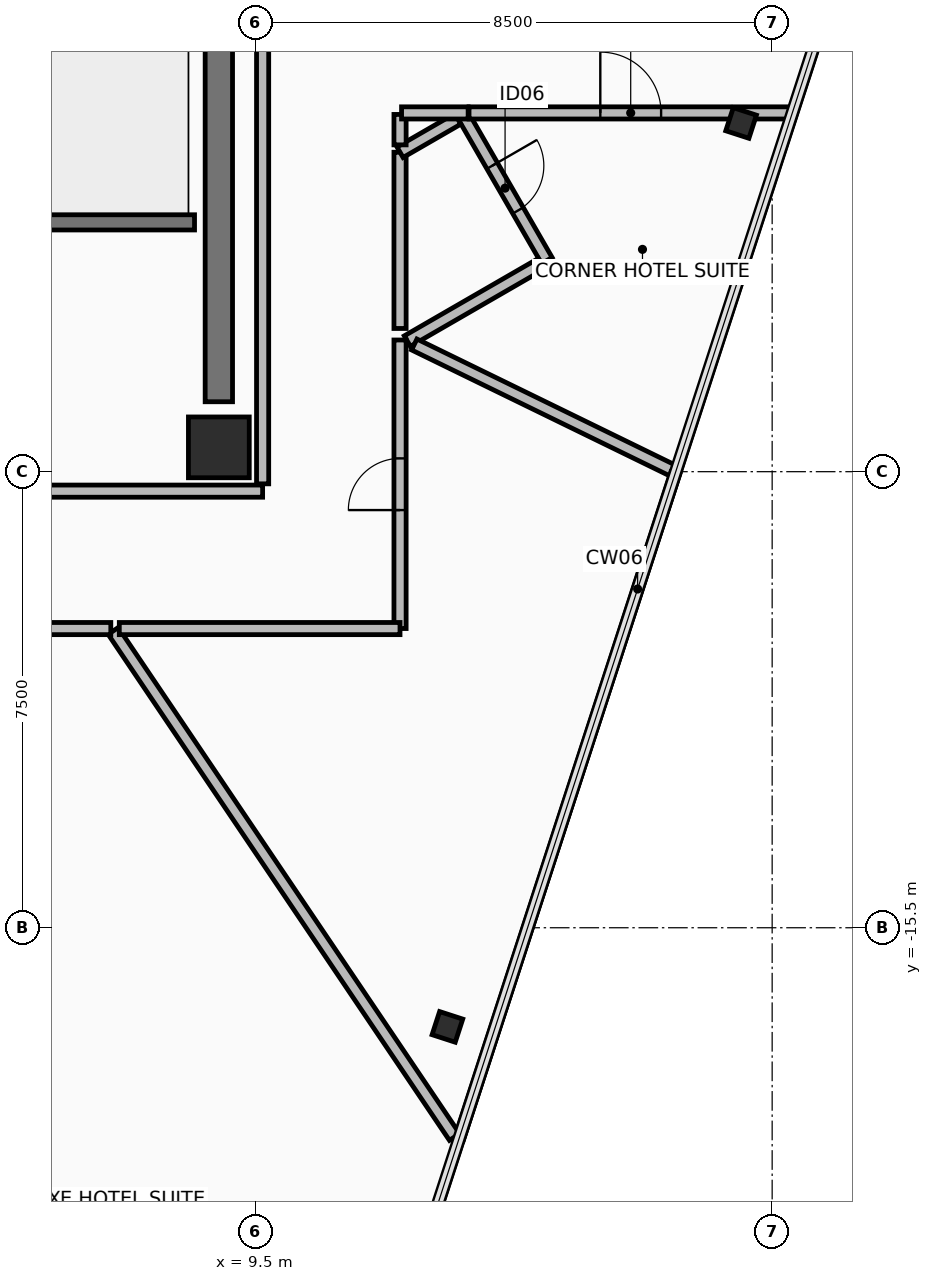
"""IFC4 building model, lengths in metres.
Left out: names, types, materials, properties, quantities, classifications, styles, units other than length and angle.
Written with IfcOpenShell. Run it as: python <this file> out.ifc"""

import sys

from ifc_helpers import new_model, si_unit, direction, frame, frame_2d, origin, origin_2d, place, context, subcontext, project, spatial, rectangle, hollow_rectangle, extrude, element, fill, save


model = new_model("IFC4")
c1 = context("Model", 3, precision=1e-05, world=origin(), true_north=direction((0.0, 1.0)))
c2 = subcontext(c1, "Body", "Model", "MODEL_VIEW")
j1 = project(units=[si_unit("LENGTHUNIT", "METRE"), si_unit("PLANEANGLEUNIT", "RADIAN")], contexts=[c1])
p1 = place(None, origin())
s1 = spatial("IfcSite", under=j1, at=p1, CompositionType="ELEMENT")
p2 = place(p1, origin())
s2 = spatial("IfcBuilding", under=s1, at=p2, CompositionType="ELEMENT")
p3 = place(p2, frame((0.0, 0.0, 279.75)))
s3 = spatial("IfcBuildingStorey", under=s2, at=p3, CompositionType="ELEMENT", Elevation=279.75)
p4 = place(p3, frame((8.9, -7.6, 0.0), z_axis=(0.0, 0.0, 1.0), x_axis=(1.0, 0.0, 0.0)))
e1 = element("IfcColumn", 1, at=p4, inside=s3, PredefinedType="COLUMN", context=c2, shape_type="SweptSolid", body=[
    extrude(rectangle(XDim=1.0, YDim=1.0, at=origin_2d()), origin(), (0.0, 0.0, 1.0), 3.65),
])
p5 = place(p3, frame((12.659, -17.131, -0.19), z_axis=(0.0, 0.0, 1.0), x_axis=(0.309018654281, 0.951055976957, 0.0)))
e2 = element("IfcColumn", 2, at=p5, inside=s3, PredefinedType="COLUMN", context=c2, shape_type="SweptSolid", body=[
    extrude(hollow_rectangle(XDim=0.4, YDim=0.4, WallThickness=0.025, at=origin_2d()), origin(), (0.0, 0.0, 1.0), 3.84),
])
p6 = place(p3, frame((17.489, -2.265, 0.0), z_axis=(0.0, 0.0, 1.0), x_axis=(0.309018654281, 0.951055976957, 0.0)))
e3 = element("IfcColumn", 3, at=p6, inside=s3, PredefinedType="COLUMN", context=c2, shape_type="SweptSolid", body=[
    extrude(hollow_rectangle(XDim=0.4, YDim=0.4, WallThickness=0.025, at=origin_2d()), origin(), (0.0, 0.0, 1.0), 3.65),
])
p7 = place(p3, frame((8.9, -6.85, 0.0), z_axis=(0.0, 0.0, 1.0), x_axis=(0.0, 1.0, 0.0)))
e4 = element("IfcWall", 4, at=p7, inside=s3, PredefinedType="SHEAR", context=c2, shape_type="SweptSolid", body=[
    extrude(rectangle(XDim=10.7, YDim=0.45, at=frame_2d((5.35, 0.0))), origin(), (0.0, 0.0, 1.0), 3.465),
])
p8 = place(p3, frame((-9.62, -8.32, 0.0), z_axis=(0.0, 0.0, 1.0), x_axis=(1.0, 0.0, 0.0)))
e5 = element("IfcWall", 5, at=p8, inside=s3, PredefinedType="PARTITIONING", context=c2, shape_type="SweptSolid", body=[
    extrude(rectangle(XDim=19.24, YDim=0.2, at=frame_2d((9.62, 0.0))), origin(), (0.0, 0.0, 1.0), 2.96),
])
p9 = place(p8, frame((7.37, 0.0, 0.0)))
e6 = element("IfcOpeningElement", 6, at=p9, cuts=e5, PredefinedType="OPENING", context=c2, shape_type="SweptSolid", body=[
    extrude(rectangle(XDim=0.9, YDim=2.1, at=frame_2d((0.45, 1.05))), frame((0.0, 0.11, 0.0), z_axis=(0.0, -1.0, 0.0), x_axis=(1.0, 0.0, 0.0)), (0.0, 0.0, 1.0), 0.22),
])
p10 = place(p8, frame((10.77, 0.0, 0.0)))
e7 = element("IfcOpeningElement", 7, at=p10, cuts=e5, PredefinedType="OPENING", context=c2, shape_type="SweptSolid", body=[
    extrude(rectangle(XDim=0.9, YDim=2.1, at=frame_2d((0.45, 1.05))), frame((0.0, 0.11, 0.0), z_axis=(0.0, -1.0, 0.0), x_axis=(1.0, 0.0, 0.0)), (0.0, 0.0, 1.0), 0.22),
])
p11 = place(p8, frame((13.97, 0.0, 0.0)))
e8 = element("IfcOpeningElement", 8, at=p11, cuts=e5, PredefinedType="OPENING", context=c2, shape_type="SweptSolid", body=[
    extrude(rectangle(XDim=0.9, YDim=2.1, at=frame_2d((0.45, 1.05))), frame((0.0, 0.11, 0.0), z_axis=(0.0, -1.0, 0.0), x_axis=(1.0, 0.0, 0.0)), (0.0, 0.0, 1.0), 0.22),
])
p12 = place(p3, frame((9.62, -8.2, 0.0), z_axis=(0.0, 0.0, 1.0), x_axis=(0.0, 1.0, 0.0)))
e9 = element("IfcWall", 9, at=p12, inside=s3, PredefinedType="PARTITIONING", context=c2, shape_type="SweptSolid", body=[
    extrude(rectangle(XDim=16.4, YDim=0.2, at=frame_2d((8.2, 0.0))), origin(), (0.0, 0.0, 1.0), 2.96),
])
p13 = place(p12, frame((12.65, 0.0, 0.0)))
e10 = element("IfcOpeningElement", 10, at=p13, cuts=e9, PredefinedType="OPENING", context=c2, shape_type="SweptSolid", body=[
    extrude(rectangle(XDim=1.1, YDim=2.15, at=frame_2d((0.55, 1.075))), frame((0.0, 0.11, 0.0), z_axis=(0.0, -1.0, 0.0), x_axis=(1.0, 0.0, 0.0)), (0.0, 0.0, 1.0), 0.22),
])
p14 = place(p3, frame((5.5, -3.9, 0.0), z_axis=(0.0, 0.0, 1.0), x_axis=(1.0, 0.0, 0.0)))
e11 = element("IfcWall", 11, at=p14, inside=s3, PredefinedType="SHEAR", context=c2, shape_type="SweptSolid", body=[
    extrude(rectangle(XDim=3.0, YDim=0.25, at=frame_2d((1.5, 0.0))), origin(), (0.0, 0.0, 1.0), 3.465),
])
p15 = place(p3, frame((12.92, -2.146, 0.0), z_axis=(0.0, 0.0, 1.0), x_axis=(0.499996545922, -0.866027397988, 0.0)))
e12 = element("IfcWall", 12, at=p15, inside=s3, PredefinedType="PARTITIONING", context=c2, shape_type="SweptSolid", body=[
    extrude(rectangle(XDim=2.75, YDim=0.2, at=frame_2d((1.375, 0.0))), origin(), (0.0, 0.0, 1.0), 2.96),
])
p16 = place(p15, frame((0.95, 0.0, 0.0)))
e13 = element("IfcOpeningElement", 13, at=p16, cuts=e12, PredefinedType="OPENING", context=c2, shape_type="SweptSolid", body=[
    extrude(rectangle(XDim=0.85, YDim=2.1, at=frame_2d((0.425, 1.05))), frame((0.0, 0.11, 0.0), z_axis=(0.0, -1.0, 0.0), x_axis=(1.0, 0.0, 0.0)), (0.0, 0.0, 1.0), 0.22),
])
p17 = place(p3, frame((14.204, -4.58, 0.0), z_axis=(0.0, 0.0, 1.0), x_axis=(-0.866038622153, -0.499977104415, 0.0)))
e14 = element("IfcWall", 14, at=p17, inside=s3, PredefinedType="PARTITIONING", context=c2, shape_type="SweptSolid", body=[
    extrude(rectangle(XDim=2.545, YDim=0.2, at=frame_2d((1.272, 0.0))), origin(), (0.0, 0.0, 1.0), 2.96),
])
p18 = place(p3, frame((11.88, -5.645, 0.0), z_axis=(0.0, 0.0, 1.0), x_axis=(0.0, 1.0, 0.0)))
e15 = element("IfcWall", 15, at=p18, inside=s3, PredefinedType="PARTITIONING", context=c2, shape_type="SweptSolid", body=[
    extrude(rectangle(XDim=2.898, YDim=0.2, at=frame_2d((1.449, 0.0))), origin(), (0.0, 0.0, 1.0), 2.96),
])
p19 = place(p3, frame((11.88, -2.747, 0.0), z_axis=(0.0, 0.0, 1.0), x_axis=(0.86609656662, 0.499876722092, 0.0)))
e16 = element("IfcWall", 16, at=p19, inside=s3, PredefinedType="PARTITIONING", context=c2, shape_type="SweptSolid", body=[
    extrude(rectangle(XDim=1.096, YDim=0.2, at=frame_2d((0.548, 0.0))), origin(), (0.0, 0.0, 1.0), 3.465),
])
p20 = place(p3, frame((11.88, -10.579, 0.0), z_axis=(0.0, 0.0, 1.0), x_axis=(0.0, 1.0, 0.0)))
e17 = element("IfcWall", 17, at=p20, inside=s3, PredefinedType="PARTITIONING", context=c2, shape_type="SweptSolid", body=[
    extrude(rectangle(XDim=4.745, YDim=0.2, at=frame_2d((2.373, 0.0))), origin(), (0.0, 0.0, 1.0), 2.96),
])
p21 = place(p20, frame((1.948, 0.0, 0.0)))
e18 = element("IfcOpeningElement", 18, at=p21, cuts=e17, PredefinedType="OPENING", context=c2, shape_type="SweptSolid", body=[
    extrude(rectangle(XDim=0.85, YDim=2.1, at=frame_2d((0.425, 1.05))), frame((0.0, 0.11, 0.0), z_axis=(0.0, -1.0, 0.0), x_axis=(1.0, 0.0, 0.0)), (0.0, 0.0, 1.0), 0.22),
])
p22 = place(p3, frame((12.114, -5.908, 0.0), z_axis=(0.0, 0.0, 1.0), x_axis=(0.898773373644, -0.438413529476, 0.0)))
e19 = element("IfcWall", 19, at=p22, inside=s3, PredefinedType="PARTITIONING", context=c2, shape_type="SweptSolid", body=[
    extrude(rectangle(XDim=4.761, YDim=0.2, at=frame_2d((2.381, 0.0))), origin(), (0.0, 0.0, 1.0), 2.81),
])
p23 = place(p3, frame((16.406, -8.026, 0.0), z_axis=(0.0, 0.0, 1.0), x_axis=(-0.309030454155, -0.951052142842, 0.0)))
e20 = element("IfcWall", 20, at=p23, inside=s3, PredefinedType="PARTITIONING", context=c2, shape_type="SweptSolid", body=[
    extrude(rectangle(XDim=11.514, YDim=0.15, at=frame_2d((5.757, 0.0))), origin(), (0.0, 0.0, 1.0), 3.465),
])
p24 = place(p3, frame((12.776, -18.941, 0.0), z_axis=(0.0, 0.0, 1.0), x_axis=(-0.559187933526, 0.829040924804, 0.0)))
e21 = element("IfcWall", 21, at=p24, inside=s3, PredefinedType="PARTITIONING", context=c2, shape_type="SweptSolid", body=[
    extrude(rectangle(XDim=10.038, YDim=0.2, at=frame_2d((5.019, 0.0))), origin(), (0.0, 0.0, 1.0), 2.81),
])
p25 = place(p3, frame((7.263, -10.58, 0.0), z_axis=(0.0, 0.0, 1.0), x_axis=(1.0, 0.0, 0.0)))
e22 = element("IfcWall", 22, at=p25, inside=s3, PredefinedType="PARTITIONING", context=c2, shape_type="SweptSolid", body=[
    extrude(rectangle(XDim=4.616, YDim=0.2, at=frame_2d((2.308, 0.0))), origin(), (0.0, 0.0, 1.0), 2.96),
])
p26 = place(p3, frame((0.767, -10.58, 0.0), z_axis=(0.0, 0.0, 1.0), x_axis=(1.0, 0.0, 0.0)))
e23 = element("IfcWall", 23, at=p26, inside=s3, PredefinedType="PARTITIONING", context=c2, shape_type="SweptSolid", body=[
    extrude(rectangle(XDim=6.356, YDim=0.2, at=frame_2d((3.178, 0.0))), origin(), (0.0, 0.0, 1.0), 3.465),
])
p27 = place(p26, frame((2.678, 0.0, 0.0)))
e24 = element("IfcOpeningElement", 24, at=p27, cuts=e23, PredefinedType="OPENING", context=c2, shape_type="SweptSolid", body=[
    extrude(rectangle(XDim=1.0, YDim=2.15, at=frame_2d((0.5, 1.075))), frame((0.0, 0.11, 0.0), z_axis=(0.0, -1.0, 0.0), x_axis=(1.0, 0.0, 0.0)), (0.0, 0.0, 1.0), 0.22),
])
p28 = place(p3, frame((11.88, -2.625, 0.0), z_axis=(0.0, 0.0, 1.0), x_axis=(0.0, 1.0, 0.0)))
e25 = element("IfcWall", 25, at=p28, inside=s3, PredefinedType="PARTITIONING", context=c2, shape_type="SweptSolid", body=[
    extrude(rectangle(XDim=0.5, YDim=0.2, at=frame_2d((0.25, 0.0))), origin(), (0.0, 0.0, 1.0), 3.465),
])
p29 = place(p3, frame((11.905, -2.1, 0.0), z_axis=(0.0, 0.0, 1.0), x_axis=(1.0, 0.0, 0.0)))
e26 = element("IfcWall", 26, at=p29, inside=s3, PredefinedType="PARTITIONING", context=c2, shape_type="SweptSolid", body=[
    extrude(rectangle(XDim=1.095, YDim=0.2, at=frame_2d((0.547, 0.0))), origin(), (0.0, 0.0, 1.0), 3.465),
])
p30 = place(p3, frame((13.015, -2.1, 0.0), z_axis=(0.0, 0.0, 1.0), x_axis=(1.0, 0.0, 0.0)))
e27 = element("IfcWall", 27, at=p30, inside=s3, PredefinedType="PARTITIONING", context=c2, shape_type="SweptSolid", body=[
    extrude(rectangle(XDim=5.317, YDim=0.2, at=frame_2d((2.658, 0.0))), origin(), (0.0, 0.0, 1.0), 2.81),
])
p31 = place(p30, frame((2.159, 0.0, 0.0)))
e28 = element("IfcOpeningElement", 28, at=p31, cuts=e27, PredefinedType="OPENING", context=c2, shape_type="SweptSolid", body=[
    extrude(rectangle(XDim=1.0, YDim=2.15, at=frame_2d((0.5, 1.075))), frame((0.0, 0.11, 0.0), z_axis=(0.0, -1.0, 0.0), x_axis=(1.0, 0.0, 0.0)), (0.0, 0.0, 1.0), 0.22),
])
p32 = place(p16, origin())
e29 = element("IfcDoor", 29, at=p32, inside=s3, OperationType="SINGLE_SWING_RIGHT", PredefinedType="DOOR", context=c2, shape_type="SweptSolid", body=[
    extrude(rectangle(XDim=0.85, YDim=2.1, at=frame_2d((0.425, 1.05))), frame((0.0, 0.025, 0.0), z_axis=(0.0, -1.0, 0.0), x_axis=(1.0, 0.0, 0.0)), (0.0, 0.0, 1.0), 0.05),
])
fill(e13, e29)
p33 = place(p21, origin())
e30 = element("IfcDoor", 30, at=p33, inside=s3, OperationType="SINGLE_SWING_RIGHT", PredefinedType="DOOR", context=c2, shape_type="SweptSolid", body=[
    extrude(rectangle(XDim=0.85, YDim=2.1, at=frame_2d((0.425, 1.05))), frame((0.0, 0.025, 0.0), z_axis=(0.0, -1.0, 0.0), x_axis=(1.0, 0.0, 0.0)), (0.0, 0.0, 1.0), 0.05),
])
fill(e18, e30)
p34 = place(p31, origin())
e31 = element("IfcDoor", 31, at=p34, inside=s3, OperationType="SINGLE_SWING_LEFT", PredefinedType="DOOR", context=c2, shape_type="SweptSolid", body=[
    extrude(rectangle(XDim=1.0, YDim=2.15, at=frame_2d((0.5, 1.075))), frame((0.0, 0.025, 0.0), z_axis=(0.0, -1.0, 0.0), x_axis=(1.0, 0.0, 0.0)), (0.0, 0.0, 1.0), 0.05),
])
fill(e28, e31)
save(model, sys.argv[1])
